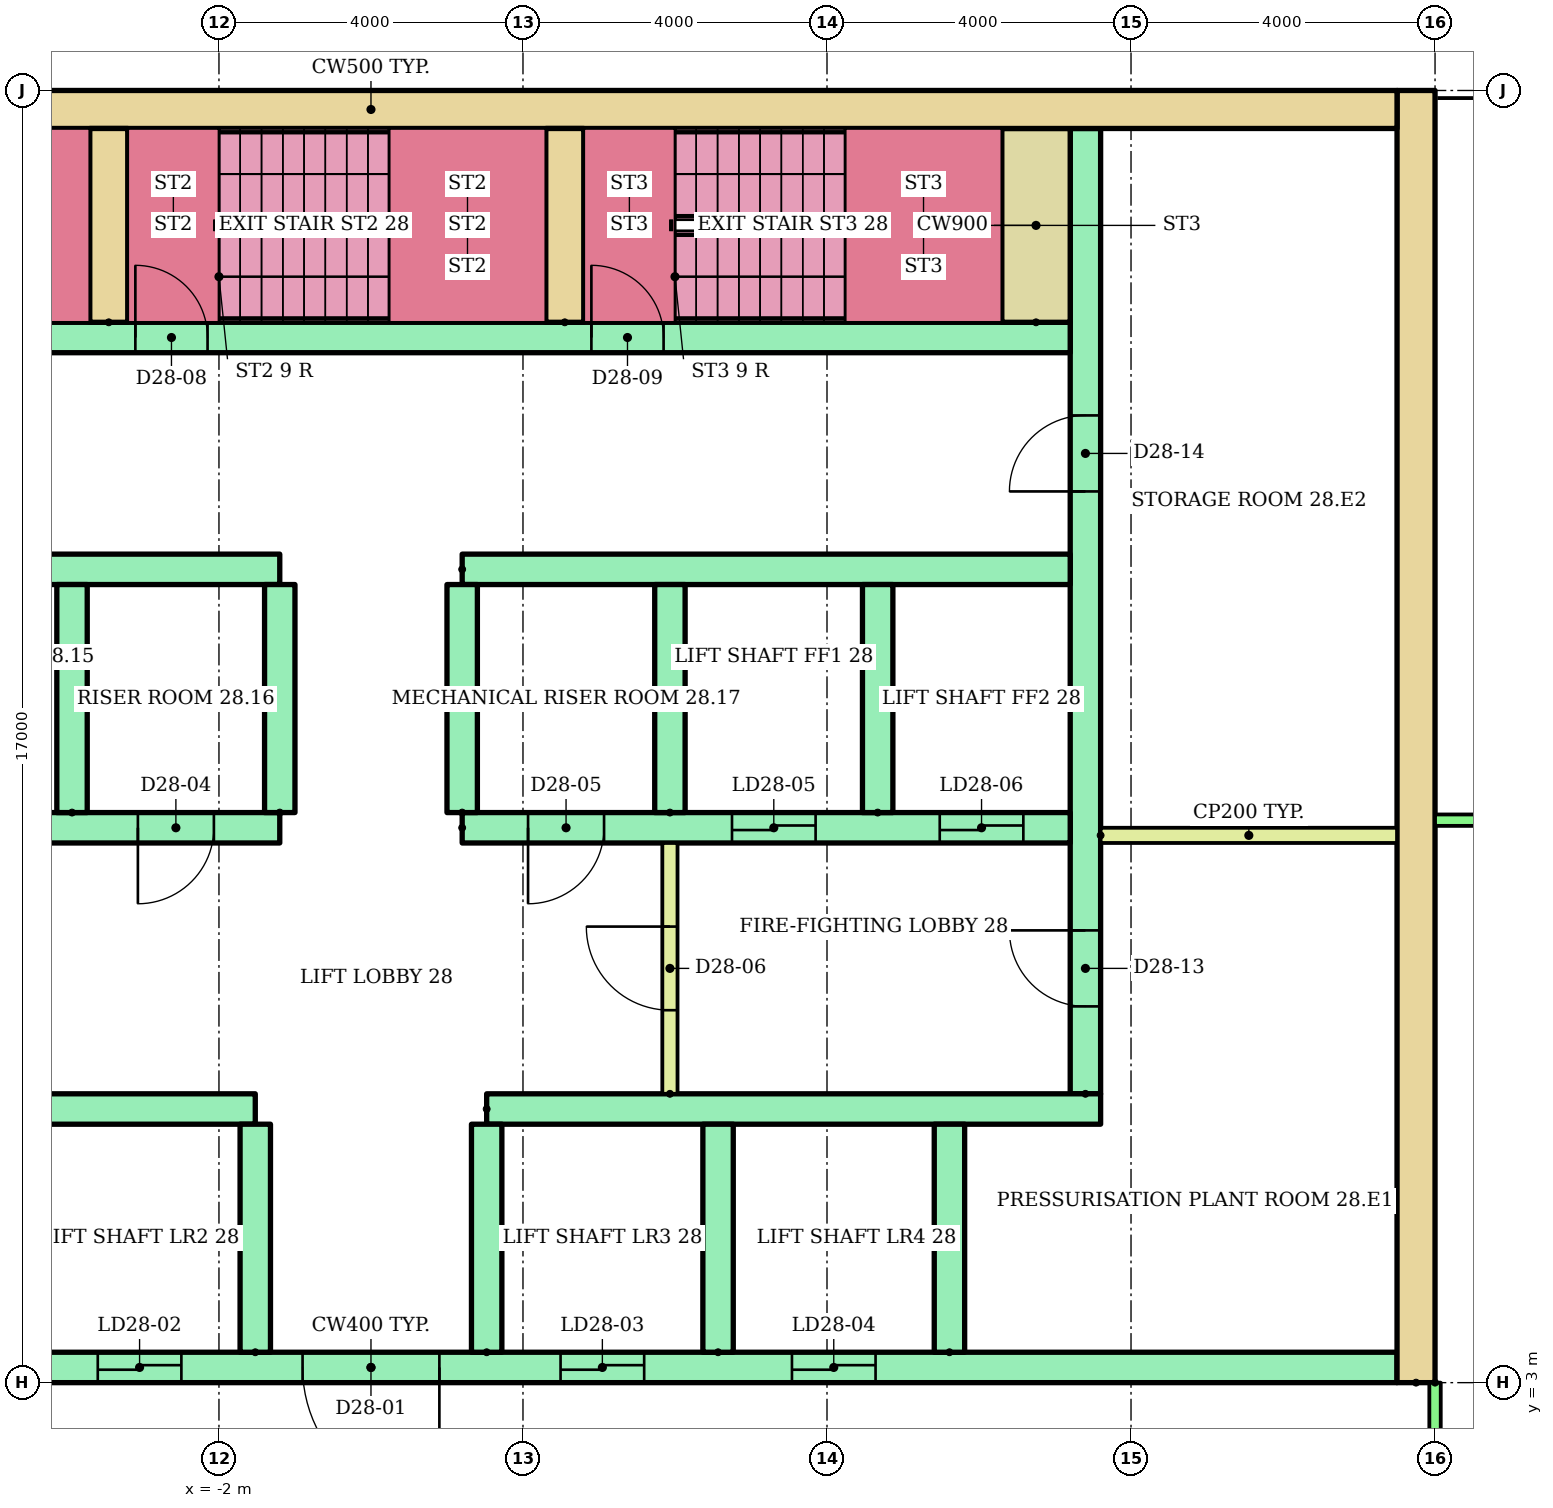
"""IFC4 building model, lengths in metres.
Left out: names, types, materials, properties, quantities, classifications, styles, units other than length and angle.
Written with IfcOpenShell. Run it as: python <this file> out.ifc"""

import sys

from ifc_helpers import new_model, si_unit, direction, frame, frame_2d, origin, place, context, subcontext, project, spatial, rectangle, extrude, element, fill, save


model = new_model("IFC4")
c1 = context("Model", 3, precision=1e-05, world=origin(), true_north=direction((0.0, 1.0)))
c2 = subcontext(c1, "Body", "Model", "MODEL_VIEW")
j1 = project(units=[si_unit("LENGTHUNIT", "METRE"), si_unit("PLANEANGLEUNIT", "RADIAN")], contexts=[c1])
p1 = place(None, origin())
s1 = spatial("IfcSite", under=j1, at=p1, CompositionType="ELEMENT")
p2 = place(p1, origin())
s2 = spatial("IfcBuilding", under=s1, at=p2, CompositionType="ELEMENT")
p3 = place(p2, frame((0.0, 0.0, 106.3)))
s3 = spatial("IfcBuildingStorey", under=s2, at=p3, CompositionType="ELEMENT", Elevation=106.3)
p4 = place(p3, frame((13.75, 3.0, 0.0), z_axis=(0.0, 0.0, 1.0), x_axis=(0.0, 1.0, 0.0)))
e1 = element("IfcWall", 1, at=p4, inside=s3, PredefinedType="SHEAR", context=c2, shape_type="SweptSolid", body=[
    extrude(rectangle(XDim=17.0, YDim=0.5, at=frame_2d((8.5, 0.0))), origin(), (0.0, 0.0, 1.0), 8.8),
])
p5 = place(p3, frame((-13.5, 19.75, 0.0)))
e2 = element("IfcWall", 2, at=p5, inside=s3, PredefinedType="SHEAR", context=c2, shape_type="SweptSolid", body=[
    extrude(rectangle(XDim=27.0, YDim=0.5, at=frame_2d((13.5, 0.0))), origin(), (0.0, 0.0, 1.0), 8.8),
])
p6 = place(p3, frame((9.4, 6.8, 0.0), z_axis=(0.0, 0.0, 1.0), x_axis=(0.0, 1.0, 0.0)))
e3 = element("IfcWall", 3, at=p6, inside=s3, PredefinedType="SHEAR", context=c2, shape_type="SweptSolid", body=[
    extrude(rectangle(XDim=12.7, YDim=0.4, at=frame_2d((6.35, 0.0))), origin(), (0.0, 0.0, 1.0), 8.8),
])
p7 = place(p6, frame((1.15, 0.0, 0.0)))
e4 = element("IfcOpeningElement", 4, at=p7, cuts=e3, PredefinedType="OPENING", context=c2, shape_type="SweptSolid", body=[
    extrude(rectangle(XDim=1.0, YDim=2.1, at=frame_2d((0.5, 1.05))), frame((0.0, 0.21, 0.0), z_axis=(0.0, -1.0, 0.0), x_axis=(1.0, 0.0, 0.0)), (0.0, 0.0, 1.0), 0.42),
])
p8 = place(p6, frame((7.925, 0.0, 0.0)))
e5 = element("IfcOpeningElement", 5, at=p8, cuts=e3, PredefinedType="OPENING", context=c2, shape_type="SweptSolid", body=[
    extrude(rectangle(XDim=1.0, YDim=2.1, at=frame_2d((0.5, 1.05))), frame((0.0, 0.21, 0.0), z_axis=(0.0, -1.0, 0.0), x_axis=(1.0, 0.0, 0.0)), (0.0, 0.0, 1.0), 0.42),
])
p9 = place(p3, frame((-13.5, 3.2, 0.0)))
e6 = element("IfcWall", 6, at=p9, inside=s3, PredefinedType="SHEAR", context=c2, shape_type="SweptSolid", body=[
    extrude(rectangle(XDim=27.0, YDim=0.4, at=frame_2d((13.5, 0.0))), origin(), (0.0, 0.0, 1.0), 8.8),
])
p10 = place(p9, frame((6.861, 0.0, 0.0)))
e7 = element("IfcOpeningElement", 7, at=p10, cuts=e6, PredefinedType="OPENING", context=c2, shape_type="SweptSolid", body=[
    extrude(rectangle(XDim=1.1, YDim=2.1, at=frame_2d((0.55, 1.05))), frame((0.0, 0.21, 0.0), z_axis=(0.0, -1.0, 0.0), x_axis=(1.0, 0.0, 0.0)), (0.0, 0.0, 1.0), 0.42),
])
p11 = place(p9, frame((9.906, 0.0, 0.0)))
e8 = element("IfcOpeningElement", 8, at=p11, cuts=e6, PredefinedType="OPENING", context=c2, shape_type="SweptSolid", body=[
    extrude(rectangle(XDim=1.1, YDim=2.1, at=frame_2d((0.55, 1.05))), frame((0.0, 0.21, 0.0), z_axis=(0.0, -1.0, 0.0), x_axis=(1.0, 0.0, 0.0)), (0.0, 0.0, 1.0), 0.42),
])
p12 = place(p9, frame((15.994, 0.0, 0.0)))
e9 = element("IfcOpeningElement", 9, at=p12, cuts=e6, PredefinedType="OPENING", context=c2, shape_type="SweptSolid", body=[
    extrude(rectangle(XDim=1.1, YDim=2.1, at=frame_2d((0.55, 1.05))), frame((0.0, 0.21, 0.0), z_axis=(0.0, -1.0, 0.0), x_axis=(1.0, 0.0, 0.0)), (0.0, 0.0, 1.0), 0.42),
])
p13 = place(p9, frame((19.039, 0.0, 0.0)))
e10 = element("IfcOpeningElement", 10, at=p13, cuts=e6, PredefinedType="OPENING", context=c2, shape_type="SweptSolid", body=[
    extrude(rectangle(XDim=1.1, YDim=2.1, at=frame_2d((0.55, 1.05))), frame((0.0, 0.21, 0.0), z_axis=(0.0, -1.0, 0.0), x_axis=(1.0, 0.0, 0.0)), (0.0, 0.0, 1.0), 0.42),
])
p14 = place(p9, frame((12.6, 0.0, 0.0)))
e11 = element("IfcOpeningElement", 11, at=p14, cuts=e6, PredefinedType="OPENING", context=c2, shape_type="SweptSolid", body=[
    extrude(rectangle(XDim=1.8, YDim=2.1, at=frame_2d((0.9, 1.05))), frame((0.0, 0.21, 0.0), z_axis=(0.0, -1.0, 0.0), x_axis=(1.0, 0.0, 0.0)), (0.0, 0.0, 1.0), 0.42),
])
p15 = place(p3, frame((-13.5, 6.6, 0.0)))
e12 = element("IfcWall", 12, at=p15, inside=s3, PredefinedType="SHEAR", context=c2, shape_type="SweptSolid", body=[
    extrude(rectangle(XDim=11.978, YDim=0.4, at=frame_2d((5.989, 0.0))), origin(), (0.0, 0.0, 1.0), 8.8),
])
p16 = place(p3, frame((1.522, 6.6, 0.0)))
e13 = element("IfcWall", 13, at=p16, inside=s3, PredefinedType="SHEAR", context=c2, shape_type="SweptSolid", body=[
    extrude(rectangle(XDim=8.078, YDim=0.4, at=frame_2d((4.039, 0.0))), origin(), (0.0, 0.0, 1.0), 8.8),
])
for number, where, z_axis, x_axis in (
    (14, (-1.522, 3.4, 0.0), (0.0, 0.0, 1.0), (0.0, 1.0, 0.0)),
    (15, (1.522, 3.4, 0.0), (0.0, 0.0, 1.0), (0.0, 1.0, 0.0)),
    (16, (4.567, 3.4, 0.0), (0.0, 0.0, 1.0), (0.0, 1.0, 0.0)),
    (17, (7.611, 3.4, 0.0), (0.0, 0.0, 1.0), (0.0, 1.0, 0.0)),
):
    element("IfcWall", number, at=place(p3, frame(where, z_axis=z_axis, x_axis=x_axis)), inside=s3, PredefinedType="SHEAR", context=c2, shape_type="SweptSolid", body=[
        extrude(rectangle(XDim=3.0, YDim=0.4, at=frame_2d((1.5, 0.0))), origin(), (0.0, 0.0, 1.0), 8.8),
    ])
p17 = place(p3, frame((-9.2, 10.3, 0.0)))
e18 = element("IfcWall", 18, at=p17, inside=s3, PredefinedType="SHEAR", context=c2, shape_type="SweptSolid", body=[
    extrude(rectangle(XDim=8.0, YDim=0.4, at=frame_2d((4.0, 0.0))), origin(), (0.0, 0.0, 1.0), 8.8),
])
p18 = place(p17, frame((0.917, 0.0, 0.0)))
e19 = element("IfcOpeningElement", 19, at=p18, cuts=e18, PredefinedType="OPENING", context=c2, shape_type="SweptSolid", body=[
    extrude(rectangle(XDim=1.0, YDim=2.1, at=frame_2d((0.5, 1.05))), frame((0.0, 0.21, 0.0), z_axis=(0.0, -1.0, 0.0), x_axis=(1.0, 0.0, 0.0)), (0.0, 0.0, 1.0), 0.42),
])
p19 = place(p17, frame((3.4, 0.0, 0.0)))
e20 = element("IfcOpeningElement", 20, at=p19, cuts=e18, PredefinedType="OPENING", context=c2, shape_type="SweptSolid", body=[
    extrude(rectangle(XDim=1.0, YDim=2.1, at=frame_2d((0.5, 1.05))), frame((0.0, 0.21, 0.0), z_axis=(0.0, -1.0, 0.0), x_axis=(1.0, 0.0, 0.0)), (0.0, 0.0, 1.0), 0.42),
])
p20 = place(p17, frame((6.133, 0.0, 0.0)))
e21 = element("IfcOpeningElement", 21, at=p20, cuts=e18, PredefinedType="OPENING", context=c2, shape_type="SweptSolid", body=[
    extrude(rectangle(XDim=1.0, YDim=2.1, at=frame_2d((0.5, 1.05))), frame((0.0, 0.21, 0.0), z_axis=(0.0, -1.0, 0.0), x_axis=(1.0, 0.0, 0.0)), (0.0, 0.0, 1.0), 0.42),
])
p21 = place(p3, frame((-9.2, 13.7, 0.0)))
e22 = element("IfcWall", 22, at=p21, inside=s3, PredefinedType="SHEAR", context=c2, shape_type="SweptSolid", body=[
    extrude(rectangle(XDim=8.0, YDim=0.4, at=frame_2d((4.0, 0.0))), origin(), (0.0, 0.0, 1.0), 8.8),
])
p22 = place(p3, frame((1.2, 10.3, 0.0)))
e23 = element("IfcWall", 23, at=p22, inside=s3, PredefinedType="SHEAR", context=c2, shape_type="SweptSolid", body=[
    extrude(rectangle(XDim=8.0, YDim=0.4, at=frame_2d((4.0, 0.0))), origin(), (0.0, 0.0, 1.0), 8.8),
])
p23 = place(p22, frame((3.55, 0.0, 0.0)))
e24 = element("IfcOpeningElement", 24, at=p23, cuts=e23, PredefinedType="OPENING", context=c2, shape_type="SweptSolid", body=[
    extrude(rectangle(XDim=1.1, YDim=2.1, at=frame_2d((0.55, 1.05))), frame((0.0, 0.21, 0.0), z_axis=(0.0, -1.0, 0.0), x_axis=(1.0, 0.0, 0.0)), (0.0, 0.0, 1.0), 0.42),
])
p24 = place(p22, frame((6.283, 0.0, 0.0)))
e25 = element("IfcOpeningElement", 25, at=p24, cuts=e23, PredefinedType="OPENING", context=c2, shape_type="SweptSolid", body=[
    extrude(rectangle(XDim=1.1, YDim=2.1, at=frame_2d((0.55, 1.05))), frame((0.0, 0.21, 0.0), z_axis=(0.0, -1.0, 0.0), x_axis=(1.0, 0.0, 0.0)), (0.0, 0.0, 1.0), 0.42),
])
p25 = place(p22, frame((0.867, 0.0, 0.0)))
e26 = element("IfcOpeningElement", 26, at=p25, cuts=e23, PredefinedType="OPENING", context=c2, shape_type="SweptSolid", body=[
    extrude(rectangle(XDim=1.0, YDim=2.1, at=frame_2d((0.5, 1.05))), frame((0.0, 0.21, 0.0), z_axis=(0.0, -1.0, 0.0), x_axis=(1.0, 0.0, 0.0)), (0.0, 0.0, 1.0), 0.42),
])
p26 = place(p3, frame((1.2, 13.7, 0.0)))
e27 = element("IfcWall", 27, at=p26, inside=s3, PredefinedType="SHEAR", context=c2, shape_type="SweptSolid", body=[
    extrude(rectangle(XDim=8.0, YDim=0.4, at=frame_2d((4.0, 0.0))), origin(), (0.0, 0.0, 1.0), 8.8),
])
for number, where, z_axis, x_axis in (
    (28, (-3.933, 10.5, 0.0), (0.0, 0.0, 1.0), (0.0, 1.0, 0.0)),
    (29, (-1.2, 10.5, 0.0), (0.0, 0.0, 1.0), (0.0, 1.0, 0.0)),
    (30, (1.2, 10.5, 0.0), (0.0, 0.0, 1.0), (0.0, 1.0, 0.0)),
    (31, (3.933, 10.5, 0.0), (0.0, 0.0, 1.0), (0.0, 1.0, 0.0)),
    (32, (6.667, 10.5, 0.0), (0.0, 0.0, 1.0), (0.0, 1.0, 0.0)),
):
    element("IfcWall", number, at=place(p3, frame(where, z_axis=z_axis, x_axis=x_axis)), inside=s3, PredefinedType="SHEAR", context=c2, shape_type="SweptSolid", body=[
        extrude(rectangle(XDim=3.0, YDim=0.4, at=frame_2d((1.5, 0.0))), origin(), (0.0, 0.0, 1.0), 8.8),
    ])
p27 = place(p3, frame((3.933, 6.8, 0.0), z_axis=(0.0, 0.0, 1.0), x_axis=(0.0, 1.0, 0.0)))
e33 = element("IfcWall", 33, at=p27, inside=s3, PredefinedType="PARTITIONING", context=c2, shape_type="SweptSolid", body=[
    extrude(rectangle(XDim=3.3, YDim=0.2, at=frame_2d((1.65, 0.0))), origin(), (0.0, 0.0, 1.0), 8.8),
])
p28 = place(p27, frame((1.1, 0.0, 0.0)))
e34 = element("IfcOpeningElement", 34, at=p28, cuts=e33, PredefinedType="OPENING", context=c2, shape_type="SweptSolid", body=[
    extrude(rectangle(XDim=1.1, YDim=2.1, at=frame_2d((0.55, 1.05))), frame((0.0, 0.11, 0.0), z_axis=(0.0, -1.0, 0.0), x_axis=(1.0, 0.0, 0.0)), (0.0, 0.0, 1.0), 0.22),
])
p29 = place(p3, frame((-9.2, 16.75, 0.0)))
e35 = element("IfcWall", 35, at=p29, inside=s3, PredefinedType="SHEAR", context=c2, shape_type="SweptSolid", body=[
    extrude(rectangle(XDim=18.4, YDim=0.4, at=frame_2d((9.2, 0.0))), origin(), (0.0, 0.0, 1.0), 8.8),
])
p30 = place(p29, frame((0.1, 0.0, 0.0)))
e36 = element("IfcOpeningElement", 36, at=p30, cuts=e35, PredefinedType="OPENING", context=c2, shape_type="SweptSolid", body=[
    extrude(rectangle(XDim=0.95, YDim=2.1, at=frame_2d((0.475, 1.05))), frame((0.0, 0.21, 0.0), z_axis=(0.0, -1.0, 0.0), x_axis=(1.0, 0.0, 0.0)), (0.0, 0.0, 1.0), 0.42),
])
p31 = place(p29, frame((6.1, 0.0, 0.0)))
e37 = element("IfcOpeningElement", 37, at=p31, cuts=e35, PredefinedType="OPENING", context=c2, shape_type="SweptSolid", body=[
    extrude(rectangle(XDim=0.95, YDim=2.1, at=frame_2d((0.475, 1.05))), frame((0.0, 0.21, 0.0), z_axis=(0.0, -1.0, 0.0), x_axis=(1.0, 0.0, 0.0)), (0.0, 0.0, 1.0), 0.42),
])
p32 = place(p29, frame((12.1, 0.0, 0.0)))
e38 = element("IfcOpeningElement", 38, at=p32, cuts=e35, PredefinedType="OPENING", context=c2, shape_type="SweptSolid", body=[
    extrude(rectangle(XDim=0.95, YDim=2.1, at=frame_2d((0.475, 1.05))), frame((0.0, 0.21, 0.0), z_axis=(0.0, -1.0, 0.0), x_axis=(1.0, 0.0, 0.0)), (0.0, 0.0, 1.0), 0.42),
])
for number, where, z_axis, x_axis in (
    (39, (-3.45, 16.95, 0.0), (0.0, 0.0, 1.0), (0.0, 1.0, 0.0)),
    (40, (2.55, 16.95, 0.0), (0.0, 0.0, 1.0), (0.0, 1.0, 0.0)),
):
    element("IfcWall", number, at=place(p3, frame(where, z_axis=z_axis, x_axis=x_axis)), inside=s3, PredefinedType="SHEAR", context=c2, shape_type="SweptSolid", body=[
        extrude(rectangle(XDim=2.55, YDim=0.5, at=frame_2d((1.275, 0.0))), origin(), (0.0, 0.0, 1.0), 8.8),
    ])
p33 = place(p3, frame((8.75, 16.95, 0.0), z_axis=(0.0, 0.0, 1.0), x_axis=(0.0, 1.0, 0.0)))
e41 = element("IfcWall", 41, at=p33, inside=s3, PredefinedType="SHEAR", context=c2, shape_type="SweptSolid", body=[
    extrude(rectangle(XDim=2.55, YDim=0.9, at=frame_2d((1.275, 0.0))), origin(), (0.0, 0.0, 1.0), 8.8),
])
p34 = place(p3, frame((9.6, 10.2, 0.0)))
e42 = element("IfcWall", 42, at=p34, inside=s3, PredefinedType="PARTITIONING", context=c2, shape_type="SweptSolid", body=[
    extrude(rectangle(XDim=3.9, YDim=0.2, at=frame_2d((1.95, 0.0))), origin(), (0.0, 0.0, 1.0), 8.8),
])
p35 = place(p3, frame((22.0, 10.4, 0.0), z_axis=(0.0, 0.0, 1.0), x_axis=(-1.0, 0.0, 0.0)))
e43 = element("IfcWall", 43, at=p35, inside=s3, PredefinedType="PARTITIONING", context=c2, shape_type="SweptSolid", body=[
    extrude(rectangle(XDim=8.0, YDim=0.15, at=frame_2d((4.0, 0.0))), origin(), (0.0, 0.0, 1.0), 8.8),
])
p36 = place(p3, frame((14.0, 3.0, 0.0), z_axis=(0.0, 0.0, 1.0), x_axis=(0.0, -1.0, 0.0)))
e44 = element("IfcWall", 44, at=p36, inside=s3, PredefinedType="PARTITIONING", context=c2, shape_type="SweptSolid", body=[
    extrude(rectangle(XDim=1.6, YDim=0.15, at=frame_2d((0.8, 0.0))), origin(), (0.0, 0.0, 1.0), 8.8),
])
p37 = place(p11, origin())
e45 = element("IfcDoor", 45, at=p37, inside=s3, OperationType="SLIDING_TO_LEFT", PredefinedType="DOOR", context=c2, shape_type="SweptSolid", body=[
    extrude(rectangle(XDim=1.1, YDim=2.1, at=frame_2d((0.55, 1.05))), frame((0.0, 0.025, 0.0), z_axis=(0.0, -1.0, 0.0), x_axis=(1.0, 0.0, 0.0)), (0.0, 0.0, 1.0), 0.05),
])
fill(e8, e45)
p38 = place(p12, origin())
e46 = element("IfcDoor", 46, at=p38, inside=s3, OperationType="SLIDING_TO_LEFT", PredefinedType="DOOR", context=c2, shape_type="SweptSolid", body=[
    extrude(rectangle(XDim=1.1, YDim=2.1, at=frame_2d((0.55, 1.05))), frame((0.0, 0.025, 0.0), z_axis=(0.0, -1.0, 0.0), x_axis=(1.0, 0.0, 0.0)), (0.0, 0.0, 1.0), 0.05),
])
fill(e9, e46)
p39 = place(p13, origin())
e47 = element("IfcDoor", 47, at=p39, inside=s3, OperationType="SLIDING_TO_LEFT", PredefinedType="DOOR", context=c2, shape_type="SweptSolid", body=[
    extrude(rectangle(XDim=1.1, YDim=2.1, at=frame_2d((0.55, 1.05))), frame((0.0, 0.025, 0.0), z_axis=(0.0, -1.0, 0.0), x_axis=(1.0, 0.0, 0.0)), (0.0, 0.0, 1.0), 0.05),
])
fill(e10, e47)
p40 = place(p14, frame((1.8, 0.0, 0.0), z_axis=(0.0, 0.0, 1.0), x_axis=(-1.0, 0.0, 0.0)))
e48 = element("IfcDoor", 48, at=p40, inside=s3, OperationType="DOUBLE_DOOR_SINGLE_SWING", PredefinedType="DOOR", context=c2, shape_type="SweptSolid", body=[
    extrude(rectangle(XDim=1.8, YDim=2.1, at=frame_2d((0.9, 1.05))), frame((0.0, 0.025, 0.0), z_axis=(0.0, -1.0, 0.0), x_axis=(1.0, 0.0, 0.0)), (0.0, 0.0, 1.0), 0.05),
])
fill(e11, e48)
p41 = place(p23, origin())
e49 = element("IfcDoor", 49, at=p41, inside=s3, OperationType="SLIDING_TO_LEFT", PredefinedType="DOOR", context=c2, shape_type="SweptSolid", body=[
    extrude(rectangle(XDim=1.1, YDim=2.1, at=frame_2d((0.55, 1.05))), frame((0.0, 0.025, 0.0), z_axis=(0.0, -1.0, 0.0), x_axis=(1.0, 0.0, 0.0)), (0.0, 0.0, 1.0), 0.05),
])
fill(e24, e49)
p42 = place(p24, origin())
e50 = element("IfcDoor", 50, at=p42, inside=s3, OperationType="SLIDING_TO_LEFT", PredefinedType="DOOR", context=c2, shape_type="SweptSolid", body=[
    extrude(rectangle(XDim=1.1, YDim=2.1, at=frame_2d((0.55, 1.05))), frame((0.0, 0.025, 0.0), z_axis=(0.0, -1.0, 0.0), x_axis=(1.0, 0.0, 0.0)), (0.0, 0.0, 1.0), 0.05),
])
fill(e25, e50)
p43 = place(p20, frame((1.0, 0.0, 0.0), z_axis=(0.0, 0.0, 1.0), x_axis=(-1.0, 0.0, 0.0)))
e51 = element("IfcDoor", 51, at=p43, inside=s3, OperationType="SINGLE_SWING_LEFT", PredefinedType="DOOR", context=c2, shape_type="SweptSolid", body=[
    extrude(rectangle(XDim=1.0, YDim=2.1, at=frame_2d((0.5, 1.05))), frame((0.0, 0.025, 0.0), z_axis=(0.0, -1.0, 0.0), x_axis=(1.0, 0.0, 0.0)), (0.0, 0.0, 1.0), 0.05),
])
fill(e21, e51)
p44 = place(p25, frame((1.0, 0.0, 0.0), z_axis=(0.0, 0.0, 1.0), x_axis=(-1.0, 0.0, 0.0)))
e52 = element("IfcDoor", 52, at=p44, inside=s3, OperationType="SINGLE_SWING_LEFT", PredefinedType="DOOR", context=c2, shape_type="SweptSolid", body=[
    extrude(rectangle(XDim=1.0, YDim=2.1, at=frame_2d((0.5, 1.05))), frame((0.0, 0.025, 0.0), z_axis=(0.0, -1.0, 0.0), x_axis=(1.0, 0.0, 0.0)), (0.0, 0.0, 1.0), 0.05),
])
fill(e26, e52)
p45 = place(p28, origin())
e53 = element("IfcDoor", 53, at=p45, inside=s3, OperationType="SINGLE_SWING_RIGHT", PredefinedType="DOOR", context=c2, shape_type="SweptSolid", body=[
    extrude(rectangle(XDim=1.1, YDim=2.1, at=frame_2d((0.55, 1.05))), frame((0.0, 0.025, 0.0), z_axis=(0.0, -1.0, 0.0), x_axis=(1.0, 0.0, 0.0)), (0.0, 0.0, 1.0), 0.05),
])
fill(e34, e53)
p46 = place(p31, origin())
e54 = element("IfcDoor", 54, at=p46, inside=s3, OperationType="SINGLE_SWING_LEFT", PredefinedType="DOOR", context=c2, shape_type="SweptSolid", body=[
    extrude(rectangle(XDim=0.95, YDim=2.1, at=frame_2d((0.475, 1.05))), frame((0.0, 0.025, 0.0), z_axis=(0.0, -1.0, 0.0), x_axis=(1.0, 0.0, 0.0)), (0.0, 0.0, 1.0), 0.05),
])
fill(e37, e54)
p47 = place(p32, origin())
e55 = element("IfcDoor", 55, at=p47, inside=s3, OperationType="SINGLE_SWING_LEFT", PredefinedType="DOOR", context=c2, shape_type="SweptSolid", body=[
    extrude(rectangle(XDim=0.95, YDim=2.1, at=frame_2d((0.475, 1.05))), frame((0.0, 0.025, 0.0), z_axis=(0.0, -1.0, 0.0), x_axis=(1.0, 0.0, 0.0)), (0.0, 0.0, 1.0), 0.05),
])
fill(e38, e55)
p48 = place(p7, origin())
e56 = element("IfcDoor", 56, at=p48, inside=s3, OperationType="SINGLE_SWING_RIGHT", PredefinedType="DOOR", context=c2, shape_type="SweptSolid", body=[
    extrude(rectangle(XDim=1.0, YDim=2.1, at=frame_2d((0.5, 1.05))), frame((0.0, 0.025, 0.0), z_axis=(0.0, -1.0, 0.0), x_axis=(1.0, 0.0, 0.0)), (0.0, 0.0, 1.0), 0.05),
])
fill(e4, e56)
p49 = place(p8, origin())
e57 = element("IfcDoor", 57, at=p49, inside=s3, OperationType="SINGLE_SWING_LEFT", PredefinedType="DOOR", context=c2, shape_type="SweptSolid", body=[
    extrude(rectangle(XDim=1.0, YDim=2.1, at=frame_2d((0.5, 1.05))), frame((0.0, 0.025, 0.0), z_axis=(0.0, -1.0, 0.0), x_axis=(1.0, 0.0, 0.0)), (0.0, 0.0, 1.0), 0.05),
])
fill(e5, e57)
save(model, sys.argv[1])
